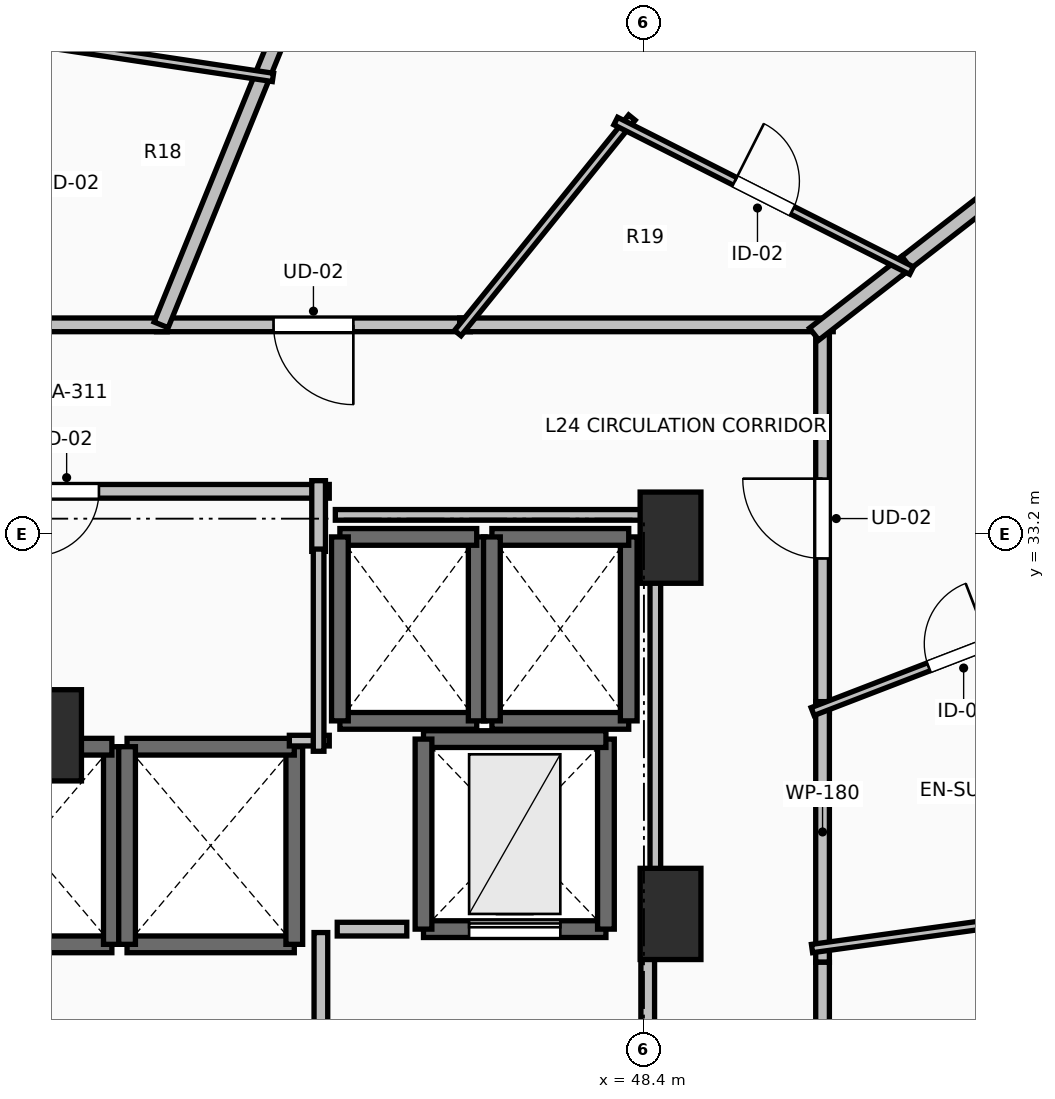
"""IFC4 building model, lengths in metres.
Left out: names, types, materials, properties, quantities, classifications, styles, units other than length and angle.
Written with IfcOpenShell. Run it as: python <this file> out.ifc"""

import sys

from ifc_helpers import new_model, si_unit, direction, frame, frame_2d, origin, origin_2d, place, context, subcontext, project, spatial, rectangle, extrude, element, fill, save


model = new_model("IFC4")
c1 = context("Model", 3, precision=1e-05, world=origin(), true_north=direction((0.0, 1.0)))
c2 = subcontext(c1, "Body", "Model", "MODEL_VIEW")
j1 = project(units=[si_unit("LENGTHUNIT", "METRE"), si_unit("PLANEANGLEUNIT", "RADIAN")], contexts=[c1])
p1 = place(None, origin())
s1 = spatial("IfcSite", under=j1, at=p1, CompositionType="ELEMENT")
p2 = place(p1, origin())
s2 = spatial("IfcBuilding", under=s1, at=p2, CompositionType="ELEMENT")
p3 = place(p2, frame((0.0, 0.0, 92.8)))
s3 = spatial("IfcBuildingStorey", under=s2, at=p3, CompositionType="ELEMENT", Elevation=92.8)
for number, where, z_axis, x_axis in (
    (1, (48.75, 33.15, 0.0), (0.0, 0.0, 1.0), (1.0, 0.0, 0.0)),
    (2, (48.75, 28.2, 0.0), (0.0, 0.0, 1.0), (1.0, 0.0, 0.0)),
    (3, (40.6, 30.55, 0.0), (0.0, 0.0, 1.0), (1.0, 0.0, 0.0)),
):
    element("IfcColumn", number, at=place(p3, frame(where, z_axis=z_axis, x_axis=x_axis)), inside=s3, PredefinedType="PILASTER", context=c2, shape_type="SweptSolid", body=[
        extrude(rectangle(XDim=0.8, YDim=1.2, at=origin_2d()), origin(), (0.0, 0.0, 1.0), 3.5),
    ])
p4 = place(p3, frame((39.2, 27.8, 0.0), z_axis=(0.0, 0.0, 1.0), x_axis=(1.0, 0.0, 0.0)))
e4 = element("IfcWall", 4, at=p4, inside=s3, PredefinedType="SOLIDWALL", context=c2, shape_type="SweptSolid", body=[
    extrude(rectangle(XDim=2.2, YDim=0.22, at=frame_2d((1.1, 0.0))), origin(), (0.0, 0.0, 1.0), 3.24),
])
p5 = place(p3, frame((41.4, 27.8, 0.0), z_axis=(0.0, 0.0, 1.0), x_axis=(0.0, 1.0, 0.0)))
e5 = element("IfcWall", 5, at=p5, inside=s3, PredefinedType="SOLIDWALL", context=c2, shape_type="SweptSolid", body=[
    extrude(rectangle(XDim=2.6, YDim=0.22, at=frame_2d((1.3, 0.0))), origin(), (0.0, 0.0, 1.0), 3.24),
])
for number, where, z_axis, x_axis in (
    (6, (41.4, 30.4, 0.0), (0.0, 0.0, 1.0), (-1.0, 0.0, 0.0)),
    (7, (41.6, 27.8, 0.0), (0.0, 0.0, 1.0), (1.0, 0.0, 0.0)),
):
    element("IfcWall", number, at=place(p3, frame(where, z_axis=z_axis, x_axis=x_axis)), inside=s3, PredefinedType="SOLIDWALL", context=c2, shape_type="SweptSolid", body=[
        extrude(rectangle(XDim=2.2, YDim=0.22, at=frame_2d((1.1, 0.0))), origin(), (0.0, 0.0, 1.0), 3.24),
    ])
p6 = place(p3, frame((43.8, 27.8, 0.0), z_axis=(0.0, 0.0, 1.0), x_axis=(0.0, 1.0, 0.0)))
e8 = element("IfcWall", 8, at=p6, inside=s3, PredefinedType="SOLIDWALL", context=c2, shape_type="SweptSolid", body=[
    extrude(rectangle(XDim=2.6, YDim=0.22, at=frame_2d((1.3, 0.0))), origin(), (0.0, 0.0, 1.0), 3.24),
])
p7 = place(p3, frame((43.8, 30.4, 0.0), z_axis=(0.0, 0.0, 1.0), x_axis=(-1.0, 0.0, 0.0)))
e9 = element("IfcWall", 9, at=p7, inside=s3, PredefinedType="SOLIDWALL", context=c2, shape_type="SweptSolid", body=[
    extrude(rectangle(XDim=2.2, YDim=0.22, at=frame_2d((1.1, 0.0))), origin(), (0.0, 0.0, 1.0), 3.24),
])
p8 = place(p3, frame((41.6, 30.4, 0.0), z_axis=(0.0, 0.0, 1.0), x_axis=(0.0, -1.0, 0.0)))
e10 = element("IfcWall", 10, at=p8, inside=s3, PredefinedType="SOLIDWALL", context=c2, shape_type="SweptSolid", body=[
    extrude(rectangle(XDim=2.6, YDim=0.22, at=frame_2d((1.3, 0.0))), origin(), (0.0, 0.0, 1.0), 3.24),
])
p9 = place(p3, frame((44.4, 30.74, 0.0), z_axis=(0.0, 0.0, 1.0), x_axis=(1.0, 0.0, 0.0)))
e11 = element("IfcWall", 11, at=p9, inside=s3, PredefinedType="SOLIDWALL", context=c2, shape_type="SweptSolid", body=[
    extrude(rectangle(XDim=1.8, YDim=0.22, at=frame_2d((0.9, 0.0))), origin(), (0.0, 0.0, 1.0), 3.24),
])
p10 = place(p3, frame((46.2, 30.74, 0.0), z_axis=(0.0, 0.0, 1.0), x_axis=(0.0, 1.0, 0.0)))
e12 = element("IfcWall", 12, at=p10, inside=s3, PredefinedType="SOLIDWALL", context=c2, shape_type="SweptSolid", body=[
    extrude(rectangle(XDim=2.42, YDim=0.22, at=frame_2d((1.21, 0.0))), origin(), (0.0, 0.0, 1.0), 3.24),
])
p11 = place(p3, frame((46.2, 33.16, 0.0), z_axis=(0.0, 0.0, 1.0), x_axis=(-1.0, 0.0, 0.0)))
e13 = element("IfcWall", 13, at=p11, inside=s3, PredefinedType="SOLIDWALL", context=c2, shape_type="SweptSolid", body=[
    extrude(rectangle(XDim=1.8, YDim=0.22, at=frame_2d((0.9, 0.0))), origin(), (0.0, 0.0, 1.0), 3.24),
])
p12 = place(p3, frame((44.4, 33.16, 0.0), z_axis=(0.0, 0.0, 1.0), x_axis=(0.0, -1.0, 0.0)))
e14 = element("IfcWall", 14, at=p12, inside=s3, PredefinedType="SOLIDWALL", context=c2, shape_type="SweptSolid", body=[
    extrude(rectangle(XDim=2.42, YDim=0.22, at=frame_2d((1.21, 0.0))), origin(), (0.0, 0.0, 1.0), 3.24),
])
p13 = place(p3, frame((46.4, 30.74, 0.0), z_axis=(0.0, 0.0, 1.0), x_axis=(1.0, 0.0, 0.0)))
e15 = element("IfcWall", 15, at=p13, inside=s3, PredefinedType="SOLIDWALL", context=c2, shape_type="SweptSolid", body=[
    extrude(rectangle(XDim=1.8, YDim=0.22, at=frame_2d((0.9, 0.0))), origin(), (0.0, 0.0, 1.0), 3.24),
])
p14 = place(p3, frame((48.2, 30.74, 0.0), z_axis=(0.0, 0.0, 1.0), x_axis=(0.0, 1.0, 0.0)))
e16 = element("IfcWall", 16, at=p14, inside=s3, PredefinedType="SOLIDWALL", context=c2, shape_type="SweptSolid", body=[
    extrude(rectangle(XDim=2.42, YDim=0.22, at=frame_2d((1.21, 0.0))), origin(), (0.0, 0.0, 1.0), 3.24),
])
p15 = place(p3, frame((48.2, 33.16, 0.0), z_axis=(0.0, 0.0, 1.0), x_axis=(-1.0, 0.0, 0.0)))
e17 = element("IfcWall", 17, at=p15, inside=s3, PredefinedType="SOLIDWALL", context=c2, shape_type="SweptSolid", body=[
    extrude(rectangle(XDim=1.8, YDim=0.22, at=frame_2d((0.9, 0.0))), origin(), (0.0, 0.0, 1.0), 3.24),
])
p16 = place(p3, frame((46.4, 33.16, 0.0), z_axis=(0.0, 0.0, 1.0), x_axis=(0.0, -1.0, 0.0)))
e18 = element("IfcWall", 18, at=p16, inside=s3, PredefinedType="SOLIDWALL", context=c2, shape_type="SweptSolid", body=[
    extrude(rectangle(XDim=2.42, YDim=0.22, at=frame_2d((1.21, 0.0))), origin(), (0.0, 0.0, 1.0), 3.24),
])
p17 = place(p3, frame((45.5, 28.0, 0.0), z_axis=(0.0, 0.0, 1.0), x_axis=(1.0, 0.0, 0.0)))
e19 = element("IfcWall", 19, at=p17, inside=s3, PredefinedType="SHEAR", context=c2, shape_type="SweptSolid", body=[
    extrude(rectangle(XDim=2.4, YDim=0.22, at=frame_2d((1.2, 0.0))), origin(), (0.0, 0.0, 1.0), 3.24),
])
p18 = place(p17, frame((0.6, 0.0, 0.0)))
e20 = element("IfcOpeningElement", 20, at=p18, cuts=e19, PredefinedType="OPENING", context=c2, shape_type="SweptSolid", body=[
    extrude(rectangle(XDim=1.2, YDim=2.2, at=frame_2d((0.6, 1.1))), frame((0.0, 0.125, 0.0), z_axis=(0.0, -1.0, 0.0), x_axis=(1.0, 0.0, 0.0)), (0.0, 0.0, 1.0), 0.25),
])
p19 = place(p3, frame((47.9, 28.0, 0.0), z_axis=(0.0, 0.0, 1.0), x_axis=(0.0, 1.0, 0.0)))
e21 = element("IfcWall", 21, at=p19, inside=s3, PredefinedType="SHEAR", context=c2, shape_type="SweptSolid", body=[
    extrude(rectangle(XDim=2.5, YDim=0.22, at=frame_2d((1.25, 0.0))), origin(), (0.0, 0.0, 1.0), 3.24),
])
p20 = place(p3, frame((47.9, 30.5, 0.0), z_axis=(0.0, 0.0, 1.0), x_axis=(-1.0, 0.0, 0.0)))
e22 = element("IfcWall", 22, at=p20, inside=s3, PredefinedType="SHEAR", context=c2, shape_type="SweptSolid", body=[
    extrude(rectangle(XDim=2.4, YDim=0.22, at=frame_2d((1.2, 0.0))), origin(), (0.0, 0.0, 1.0), 3.24),
])
p21 = place(p3, frame((45.5, 30.5, 0.0), z_axis=(0.0, 0.0, 1.0), x_axis=(0.0, -1.0, 0.0)))
e23 = element("IfcWall", 23, at=p21, inside=s3, PredefinedType="SHEAR", context=c2, shape_type="SweptSolid", body=[
    extrude(rectangle(XDim=2.5, YDim=0.22, at=frame_2d((1.25, 0.0))), origin(), (0.0, 0.0, 1.0), 3.24),
])
p22 = place(p3, frame((44.15, 27.955, 0.0), z_axis=(0.0, 0.0, 1.0), x_axis=(0.0, -1.0, 0.0)))
e24 = element("IfcWall", 24, at=p22, inside=s3, PredefinedType="PARTITIONING", context=c2, shape_type="SweptSolid", body=[
    extrude(rectangle(XDim=3.91, YDim=0.18, at=frame_2d((1.955, 0.0))), origin(), (0.0, 0.0, 1.0), 3.24),
])
p23 = place(p22, frame((1.355, 0.0, 0.0)))
e25 = element("IfcOpeningElement", 25, at=p23, cuts=e24, PredefinedType="OPENING", context=c2, shape_type="SweptSolid", body=[
    extrude(rectangle(XDim=1.2, YDim=2.15, at=frame_2d((0.6, 1.075))), frame((0.0, 0.105, 0.0), z_axis=(0.0, -1.0, 0.0), x_axis=(1.0, 0.0, 0.0)), (0.0, 0.0, 1.0), 0.21),
])
p24 = place(p3, frame((48.45, 23.95, 0.0), z_axis=(0.0, 0.0, 1.0), x_axis=(0.0, 1.0, 0.0)))
e26 = element("IfcWall", 26, at=p24, inside=s3, PredefinedType="PARTITIONING", context=c2, shape_type="SweptSolid", body=[
    extrude(rectangle(XDim=4.05, YDim=0.18, at=frame_2d((2.025, 0.0))), origin(), (0.0, 0.0, 1.0), 3.24),
])
p25 = place(p24, frame((1.425, 0.0, 0.0)))
e27 = element("IfcOpeningElement", 27, at=p25, cuts=e26, PredefinedType="OPENING", context=c2, shape_type="SweptSolid", body=[
    extrude(rectangle(XDim=1.2, YDim=2.15, at=frame_2d((0.6, 1.075))), frame((0.0, 0.105, 0.0), z_axis=(0.0, -1.0, 0.0), x_axis=(1.0, 0.0, 0.0)), (0.0, 0.0, 1.0), 0.21),
])
p26 = place(p3, frame((44.26, 33.76, 0.0), z_axis=(0.0, 0.0, 1.0), x_axis=(-1.0, 0.0, 0.0)))
e28 = element("IfcWall", 28, at=p26, inside=s3, PredefinedType="PARTITIONING", context=c2, shape_type="SweptSolid", body=[
    extrude(rectangle(XDim=6.91, YDim=0.18, at=frame_2d((3.455, 0.0))), origin(), (0.0, 0.0, 1.0), 3.24),
])
p27 = place(p26, frame((3.03, 0.0, 0.0)))
e29 = element("IfcOpeningElement", 29, at=p27, cuts=e28, PredefinedType="OPENING", context=c2, shape_type="SweptSolid", body=[
    extrude(rectangle(XDim=0.85, YDim=2.1, at=frame_2d((0.425, 1.05))), frame((0.0, 0.105, 0.0), z_axis=(0.0, -1.0, 0.0), x_axis=(1.0, 0.0, 0.0)), (0.0, 0.0, 1.0), 0.21),
])
p28 = place(p3, frame((44.12, 32.97, 0.0), z_axis=(0.0, 0.0, 1.0), x_axis=(0.0, 1.0, 0.0)))
e30 = element("IfcWall", 30, at=p28, inside=s3, PredefinedType="PARTITIONING", context=c2, shape_type="SweptSolid", body=[
    extrude(rectangle(XDim=0.93, YDim=0.18, at=frame_2d((0.465, 0.0))), origin(), (0.0, 0.0, 1.0), 3.24),
])
p29 = place(p3, frame((50.75, 30.853, 0.0), z_axis=(0.0, 0.0, 1.0), x_axis=(0.0, 1.0, 0.0)))
e31 = element("IfcWall", 31, at=p29, inside=s3, PredefinedType="PARTITIONING", context=c2, shape_type="SweptSolid", body=[
    extrude(rectangle(XDim=5.097, YDim=0.18, at=frame_2d((2.548, 0.0))), origin(), (0.0, 0.0, 1.0), 2.432),
])
p30 = place(p29, frame((2.023, 0.0, 0.0)))
e32 = element("IfcOpeningElement", 32, at=p30, cuts=e31, PredefinedType="OPENING", context=c2, shape_type="SweptSolid", body=[
    extrude(rectangle(XDim=1.05, YDim=2.2, at=frame_2d((0.525, 1.1))), frame((0.0, 0.105, 0.0), z_axis=(0.0, -1.0, 0.0), x_axis=(1.0, 0.0, 0.0)), (0.0, 0.0, 1.0), 0.21),
])
p31 = place(p3, frame((50.75, 27.564, 0.0), z_axis=(0.0, 0.0, 1.0), x_axis=(0.0, 1.0, 0.0)))
e33 = element("IfcWall", 33, at=p31, inside=s3, PredefinedType="PARTITIONING", context=c2, shape_type="SweptSolid", body=[
    extrude(rectangle(XDim=3.429, YDim=0.18, at=frame_2d((1.714, 0.0))), origin(), (0.0, 0.0, 1.0), 2.432),
])
p32 = place(p3, frame((46.116, 35.95, 0.0), z_axis=(0.0, 0.0, 1.0), x_axis=(-1.0, 0.0, 0.0)))
e34 = element("IfcWall", 34, at=p32, inside=s3, PredefinedType="PARTITIONING", context=c2, shape_type="SweptSolid", body=[
    extrude(rectangle(XDim=4.128, YDim=0.18, at=frame_2d((2.064, 0.0))), origin(), (0.0, 0.0, 1.0), 2.972),
])
p33 = place(p32, frame((1.539, 0.0, 0.0)))
e35 = element("IfcOpeningElement", 35, at=p33, cuts=e34, PredefinedType="OPENING", context=c2, shape_type="SweptSolid", body=[
    extrude(rectangle(XDim=1.05, YDim=2.2, at=frame_2d((0.525, 1.1))), frame((0.0, 0.105, 0.0), z_axis=(0.0, -1.0, 0.0), x_axis=(1.0, 0.0, 0.0)), (0.0, 0.0, 1.0), 0.21),
])
p34 = place(p3, frame((50.89, 35.95, 0.0), z_axis=(0.0, 0.0, 1.0), x_axis=(-1.0, 0.0, 0.0)))
e36 = element("IfcWall", 36, at=p34, inside=s3, PredefinedType="PARTITIONING", context=c2, shape_type="SweptSolid", body=[
    extrude(rectangle(XDim=4.914, YDim=0.18, at=frame_2d((2.457, 0.0))), origin(), (0.0, 0.0, 1.0), 2.432),
])
p35 = place(p3, frame((42.128, 35.95, 0.0), z_axis=(0.0, 0.0, 1.0), x_axis=(-1.0, 0.0, 0.0)))
e37 = element("IfcWall", 37, at=p35, inside=s3, PredefinedType="PARTITIONING", context=c2, shape_type="SweptSolid", body=[
    extrude(rectangle(XDim=2.643, YDim=0.18, at=frame_2d((1.321, 0.0))), origin(), (0.0, 0.0, 1.0), 2.972),
])
p36 = place(p3, frame((50.75, 16.409, 0.0), z_axis=(0.0, 0.0, 1.0), x_axis=(0.0, 1.0, 0.0)))
e38 = element("IfcWall", 38, at=p36, inside=s3, PredefinedType="PARTITIONING", context=c2, shape_type="SweptSolid", body=[
    extrude(rectangle(XDim=11.155, YDim=0.18, at=frame_2d((5.578, 0.0))), origin(), (0.0, 0.0, 1.0), 2.432),
])
p37 = place(p36, frame((5.077, 0.0, 0.0)))
e39 = element("IfcOpeningElement", 39, at=p37, cuts=e38, PredefinedType="OPENING", context=c2, shape_type="SweptSolid", body=[
    extrude(rectangle(XDim=1.0, YDim=2.15, at=frame_2d((0.5, 1.075))), frame((0.0, 0.105, 0.0), z_axis=(0.0, -1.0, 0.0), x_axis=(1.0, 0.0, 0.0)), (0.0, 0.0, 1.0), 0.21),
])
p38 = place(p3, frame((56.047, 28.497, 0.0), z_axis=(0.0, 0.0, 1.0), x_axis=(-0.990553307294, -0.137128207927, 0.0)))
e40 = element("IfcWall", 40, at=p38, inside=s3, PredefinedType="PARTITIONING", context=c2, shape_type="SweptSolid", body=[
    extrude(rectangle(XDim=5.487, YDim=0.11, at=frame_2d((2.744, 0.0))), origin(), (0.0, 0.0, 1.0), 2.432),
])
p39 = place(p3, frame((50.619, 30.863, 0.0), z_axis=(0.0, 0.0, 1.0), x_axis=(0.933189718051, 0.359384126144, 0.0)))
e41 = element("IfcWall", 41, at=p39, inside=s3, PredefinedType="PARTITIONING", context=c2, shape_type="SweptSolid", body=[
    extrude(rectangle(XDim=4.119, YDim=0.11, at=frame_2d((2.06, 0.0))), origin(), (0.0, 0.0, 1.0), 2.972),
])
p40 = place(p39, frame((1.635, 0.0, 0.0)))
e42 = element("IfcOpeningElement", 42, at=p40, cuts=e41, PredefinedType="OPENING", context=c2, shape_type="SweptSolid", body=[
    extrude(rectangle(XDim=0.85, YDim=2.1, at=frame_2d((0.425, 1.05))), frame((0.0, 0.07, 0.0), z_axis=(0.0, -1.0, 0.0), x_axis=(1.0, 0.0, 0.0)), (0.0, 0.0, 1.0), 0.14),
])
p41 = place(p3, frame((56.275, 40.21, 0.0), z_axis=(0.0, 0.0, 1.0), x_axis=(-0.78943235806, -0.613837561614, 0.0)))
e43 = element("IfcWall", 43, at=p41, inside=s3, PredefinedType="PARTITIONING", context=c2, shape_type="SweptSolid", body=[
    extrude(rectangle(XDim=5.741, YDim=0.2, at=frame_2d((2.87, 0.0))), origin(), (0.0, 0.0, 1.0), 2.677),
])
p42 = place(p3, frame((51.854, 36.772, 0.0), z_axis=(0.0, 0.0, 1.0), x_axis=(-0.789420593357, -0.613852691436, 0.0)))
e44 = element("IfcWall", 44, at=p42, inside=s3, PredefinedType="PARTITIONING", context=c2, shape_type="SweptSolid", body=[
    extrude(rectangle(XDim=1.538, YDim=0.2, at=frame_2d((0.769, 0.0))), origin(), (0.0, 0.0, 1.0), 2.922),
])
p43 = place(p3, frame((45.951, 35.841, 0.0), z_axis=(0.0, 0.0, 1.0), x_axis=(0.628411924203, 0.77788074505, 0.0)))
e45 = element("IfcWall", 45, at=p43, inside=s3, PredefinedType="PARTITIONING", context=c2, shape_type="SweptSolid", body=[
    extrude(rectangle(XDim=3.646, YDim=0.11, at=frame_2d((1.823, 0.0))), origin(), (0.0, 0.0, 1.0), 2.432),
])
p44 = place(p3, frame((48.029, 38.631, 0.0), z_axis=(0.0, 0.0, 1.0), x_axis=(0.892459125519, -0.451128262558, 0.0)))
e46 = element("IfcWall", 46, at=p44, inside=s3, PredefinedType="PARTITIONING", context=c2, shape_type="SweptSolid", body=[
    extrude(rectangle(XDim=4.361, YDim=0.11, at=frame_2d((2.18, 0.0))), origin(), (0.0, 0.0, 1.0), 3.24),
])
p45 = place(p44, frame((1.755, 0.0, 0.0)))
e47 = element("IfcOpeningElement", 47, at=p45, cuts=e46, PredefinedType="OPENING", context=c2, shape_type="SweptSolid", body=[
    extrude(rectangle(XDim=0.85, YDim=2.1, at=frame_2d((0.425, 1.05))), frame((0.0, 0.07, 0.0), z_axis=(0.0, -1.0, 0.0), x_axis=(1.0, 0.0, 0.0)), (0.0, 0.0, 1.0), 0.14),
])
p46 = place(p3, frame((45.682, 44.88, 0.0), z_axis=(0.0, 0.0, 1.0), x_axis=(-0.376911553655, -0.9262492541, 0.0)))
e48 = element("IfcWall", 48, at=p46, inside=s3, PredefinedType="PARTITIONING", context=c2, shape_type="SweptSolid", body=[
    extrude(rectangle(XDim=9.641, YDim=0.2, at=frame_2d((4.82, 0.0))), origin(), (0.0, 0.0, 1.0), 2.677),
])
p47 = place(p3, frame((40.017, 39.733, 0.0), z_axis=(0.0, 0.0, 1.0), x_axis=(0.988835521732, -0.149011110196, 0.0)))
e49 = element("IfcWall", 49, at=p47, inside=s3, PredefinedType="PARTITIONING", context=c2, shape_type="SweptSolid", body=[
    extrude(rectangle(XDim=3.542, YDim=0.11, at=frame_2d((1.771, 0.0))), origin(), (0.0, 0.0, 1.0), 3.24),
])
p48 = place(p3, frame((45.28, 28.0, 0.0), z_axis=(0.0, 0.0, 1.0), x_axis=(-1.0, 0.0, 0.0)))
e50 = element("IfcWall", 50, at=p48, inside=s3, PredefinedType="PARTITIONING", context=c2, shape_type="SweptSolid", body=[
    extrude(rectangle(XDim=0.915, YDim=0.18, at=frame_2d((0.458, 0.0))), origin(), (0.0, 0.0, 1.0), 3.24),
])
p49 = place(p3, frame((43.735, 30.48, 0.0), z_axis=(0.0, 0.0, 1.0), x_axis=(1.0, 0.0, 0.0)))
e51 = element("IfcWall", 51, at=p49, inside=s3, PredefinedType="PARTITIONING", context=c2, shape_type="SweptSolid", body=[
    extrude(rectangle(XDim=0.525, YDim=0.14, at=frame_2d((0.262, 0.0))), origin(), (0.0, 0.0, 1.0), 3.24),
])
p50 = place(p3, frame((44.12, 30.34, 0.0), z_axis=(0.0, 0.0, 1.0), x_axis=(0.0, 1.0, 0.0)))
e52 = element("IfcWall", 52, at=p50, inside=s3, PredefinedType="PARTITIONING", context=c2, shape_type="SweptSolid", body=[
    extrude(rectangle(XDim=2.66, YDim=0.14, at=frame_2d((1.33, 0.0))), origin(), (0.0, 0.0, 1.0), 3.24),
])
p51 = place(p3, frame((44.34, 33.45, 0.0), z_axis=(0.0, 0.0, 1.0), x_axis=(1.0, 0.0, 0.0)))
e53 = element("IfcWall", 53, at=p51, inside=s3, PredefinedType="PARTITIONING", context=c2, shape_type="SweptSolid", body=[
    extrude(rectangle(XDim=4.21, YDim=0.14, at=frame_2d((2.105, 0.0))), origin(), (0.0, 0.0, 1.0), 2.432),
])
p52 = place(p3, frame((48.55, 33.45, 0.0), z_axis=(0.0, 0.0, 1.0), x_axis=(0.0, -1.0, 0.0)))
e54 = element("IfcWall", 54, at=p52, inside=s3, PredefinedType="PARTITIONING", context=c2, shape_type="SweptSolid", body=[
    extrude(rectangle(XDim=5.254, YDim=0.14, at=frame_2d((2.627, 0.0))), origin(), (0.0, 0.0, 1.0), 2.432),
])
p53 = place(p18, origin())
e55 = element("IfcDoor", 55, at=p53, inside=s3, OperationType="SLIDING_TO_LEFT", PredefinedType="DOOR", context=c2, shape_type="SweptSolid", body=[
    extrude(rectangle(XDim=1.2, YDim=2.2, at=frame_2d((0.6, 1.1))), frame((0.0, 0.025, 0.0), z_axis=(0.0, -1.0, 0.0), x_axis=(1.0, 0.0, 0.0)), (0.0, 0.0, 1.0), 0.05),
])
fill(e20, e55)
p54 = place(p27, origin())
e56 = element("IfcDoor", 56, at=p54, inside=s3, OperationType="SINGLE_SWING_RIGHT", PredefinedType="DOOR", context=c2, shape_type="SweptSolid", body=[
    extrude(rectangle(XDim=0.85, YDim=2.1, at=frame_2d((0.425, 1.05))), frame((0.0, 0.025, 0.0), z_axis=(0.0, -1.0, 0.0), x_axis=(1.0, 0.0, 0.0)), (0.0, 0.0, 1.0), 0.05),
])
fill(e29, e56)
p55 = place(p30, origin())
e57 = element("IfcDoor", 57, at=p55, inside=s3, OperationType="SINGLE_SWING_RIGHT", PredefinedType="DOOR", context=c2, shape_type="SweptSolid", body=[
    extrude(rectangle(XDim=1.05, YDim=2.2, at=frame_2d((0.525, 1.1))), frame((0.0, 0.025, 0.0), z_axis=(0.0, -1.0, 0.0), x_axis=(1.0, 0.0, 0.0)), (0.0, 0.0, 1.0), 0.05),
])
fill(e32, e57)
p56 = place(p33, origin())
e58 = element("IfcDoor", 58, at=p56, inside=s3, OperationType="SINGLE_SWING_LEFT", PredefinedType="DOOR", context=c2, shape_type="SweptSolid", body=[
    extrude(rectangle(XDim=1.05, YDim=2.2, at=frame_2d((0.525, 1.1))), frame((0.0, 0.025, 0.0), z_axis=(0.0, -1.0, 0.0), x_axis=(1.0, 0.0, 0.0)), (0.0, 0.0, 1.0), 0.05),
])
fill(e35, e58)
p57 = place(p40, origin())
e59 = element("IfcDoor", 59, at=p57, inside=s3, OperationType="SINGLE_SWING_RIGHT", PredefinedType="DOOR", context=c2, shape_type="SweptSolid", body=[
    extrude(rectangle(XDim=0.85, YDim=2.1, at=frame_2d((0.425, 1.05))), frame((0.0, 0.025, 0.0), z_axis=(0.0, -1.0, 0.0), x_axis=(1.0, 0.0, 0.0)), (0.0, 0.0, 1.0), 0.05),
])
fill(e42, e59)
p58 = place(p45, origin())
e60 = element("IfcDoor", 60, at=p58, inside=s3, OperationType="SINGLE_SWING_LEFT", PredefinedType="DOOR", context=c2, shape_type="SweptSolid", body=[
    extrude(rectangle(XDim=0.85, YDim=2.1, at=frame_2d((0.425, 1.05))), frame((0.0, 0.025, 0.0), z_axis=(0.0, -1.0, 0.0), x_axis=(1.0, 0.0, 0.0)), (0.0, 0.0, 1.0), 0.05),
])
fill(e47, e60)
save(model, sys.argv[1])
